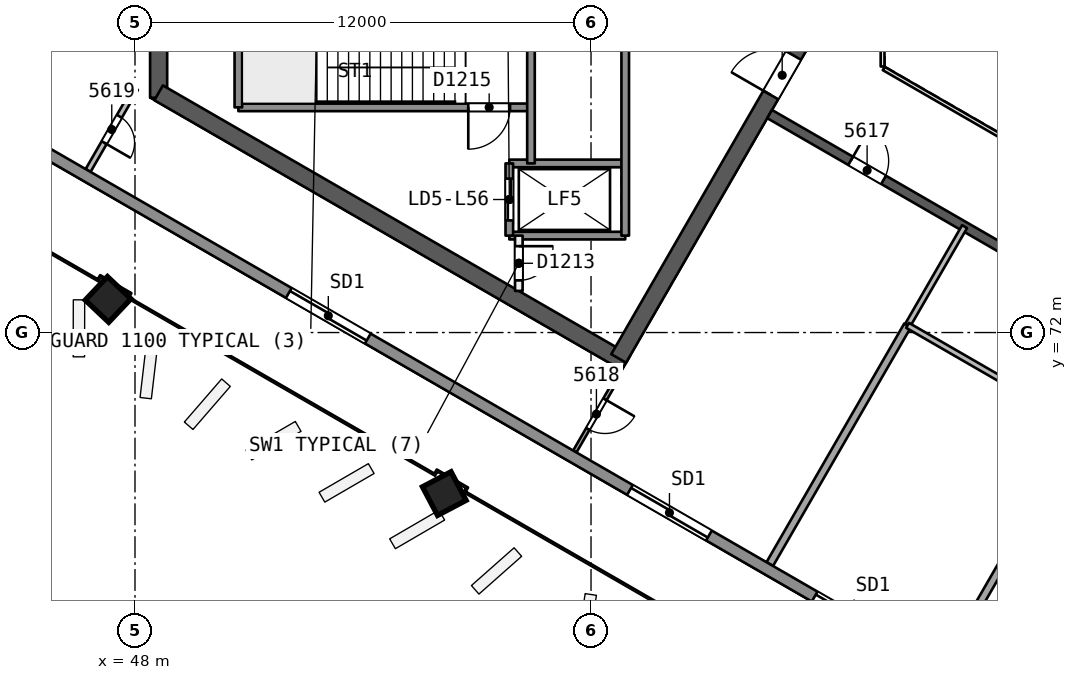
"""IFC4 building model, lengths in metres.
Left out: names, types, materials, properties, quantities, classifications, styles, units other than length and angle.
Written with IfcOpenShell. Run it as: python <this file> out.ifc"""

import sys

from ifc_helpers import new_model, si_unit, direction, frame, frame_2d, origin, origin_2d, place, context, subcontext, project, spatial, rectangle, extrude, element, fill, save


model = new_model("IFC4")
c1 = context("Model", 3, precision=1e-05, world=origin(), true_north=direction((0.0, 1.0)))
c2 = subcontext(c1, "Body", "Model", "MODEL_VIEW")
j1 = project(units=[si_unit("LENGTHUNIT", "METRE"), si_unit("PLANEANGLEUNIT", "RADIAN")], contexts=[c1])
p1 = place(None, origin())
s1 = spatial("IfcSite", under=j1, at=p1, CompositionType="ELEMENT")
p2 = place(p1, origin())
s2 = spatial("IfcBuilding", under=s1, at=p2, CompositionType="ELEMENT")
p3 = place(p2, frame((0.0, 0.0, 228.0)))
s3 = spatial("IfcBuildingStorey", under=s2, at=p3, CompositionType="ELEMENT", Elevation=228.0)
p4 = place(p3, frame((48.622, 81.693, 0.0), z_axis=(0.0, 0.0, 1.0), x_axis=(0.0, -1.0, 0.0)))
e1 = element("IfcWall", 1, at=p4, inside=s3, PredefinedType="SHEAR", context=c2, shape_type="SweptSolid", body=[
    extrude(rectangle(XDim=3.515, YDim=0.45, at=frame_2d((1.758, 0.0))), origin(), (0.0, 0.0, 1.0), 3.7),
])
p5 = place(p3, frame((48.622, 78.307, 0.0), z_axis=(0.0, 0.0, 1.0), x_axis=(0.86602701116, -0.499997215934, 0.0)))
e2 = element("IfcWall", 2, at=p5, inside=s3, PredefinedType="SHEAR", context=c2, shape_type="SweptSolid", body=[
    extrude(rectangle(XDim=14.204, YDim=0.45, at=frame_2d((7.102, 0.0))), origin(), (0.0, 0.0, 1.0), 3.7),
])
p6 = place(p3, frame((60.728, 71.318, 0.0), z_axis=(0.0, 0.0, 1.0), x_axis=(0.500012416173, 0.866018235185, 0.0)))
e3 = element("IfcWall", 3, at=p6, inside=s3, PredefinedType="SHEAR", context=c2, shape_type="SweptSolid", body=[
    extrude(rectangle(XDim=10.155, YDim=0.45, at=frame_2d((5.078, 0.0))), origin(), (0.0, 0.0, 1.0), 3.7),
])
p7 = place(p6, frame((8.005, 0.0, 0.0)))
e4 = element("IfcOpeningElement", 4, at=p7, cuts=e3, PredefinedType="OPENING", context=c2, shape_type="SweptSolid", body=[
    extrude(rectangle(XDim=1.2, YDim=2.1, at=frame_2d((0.6, 1.05))), frame((0.0, 0.235, 0.0), z_axis=(0.0, -1.0, 0.0), x_axis=(1.0, 0.0, 0.0)), (0.0, 0.0, 1.0), 0.471),
])
p8 = place(p3, frame((64.7, 77.748, 0.0), z_axis=(0.0, 0.0, 1.0), x_axis=(0.866026492143, -0.499998114903, 0.0)))
e5 = element("IfcWall", 5, at=p8, inside=s3, PredefinedType="SHEAR", context=c2, shape_type="SweptSolid", body=[
    extrude(rectangle(XDim=15.588, YDim=0.25, at=frame_2d((7.794, 0.0))), origin(), (0.0, 0.0, 1.0), 3.3),
])
p9 = place(p8, frame((2.462, 0.0, 0.0)))
e6 = element("IfcOpeningElement", 6, at=p9, cuts=e5, PredefinedType="OPENING", context=c2, shape_type="SweptSolid", body=[
    extrude(rectangle(XDim=1.0, YDim=2.1, at=frame_2d((0.5, 1.05))), frame((0.0, 0.135, 0.0), z_axis=(0.0, -1.0, 0.0), x_axis=(1.0, 0.0, 0.0)), (0.0, 0.0, 1.0), 0.271),
])
p10 = place(p8, frame((9.474, 0.0, 0.0)))
e7 = element("IfcOpeningElement", 7, at=p10, cuts=e5, PredefinedType="OPENING", context=c2, shape_type="SweptSolid", body=[
    extrude(rectangle(XDim=1.1, YDim=2.1, at=frame_2d((0.55, 1.05))), frame((0.0, 0.135, 0.0), z_axis=(0.0, -1.0, 0.0), x_axis=(1.0, 0.0, 0.0)), (0.0, 0.0, 1.0), 0.271),
])
p11 = place(p8, frame((12.906, 0.0, 0.0)))
e8 = element("IfcOpeningElement", 8, at=p11, cuts=e5, PredefinedType="OPENING", context=c2, shape_type="SweptSolid", body=[
    extrude(rectangle(XDim=1.0, YDim=2.1, at=frame_2d((0.5, 1.05))), frame((0.0, 0.135, 0.0), z_axis=(0.0, -1.0, 0.0), x_axis=(1.0, 0.0, 0.0)), (0.0, 0.0, 1.0), 0.271),
])
p12 = place(p3, frame((47.258, 72.862, 0.0), z_axis=(0.028559101991, 0.006859460986, 0.999568569678), x_axis=(-0.866410384874, 0.498876768373, 0.021331079692)))
e9 = element("IfcColumn", 9, at=p12, inside=s3, PredefinedType="COLUMN", context=c2, shape_type="SweptSolid", body=[
    extrude(rectangle(XDim=0.85, YDim=0.85, at=origin_2d()), origin(), (0.0, 0.0, 1.0), 3.702),
])
p13 = place(p3, frame((56.116, 67.748, 0.0), z_axis=(0.019328516974, 0.012138044789, 0.999739504221), x_axis=(-0.865690909737, 0.500465383244, 0.010660627254)))
e10 = element("IfcColumn", 10, at=p13, inside=s3, PredefinedType="COLUMN", context=c2, shape_type="SweptSolid", body=[
    extrude(rectangle(XDim=0.85, YDim=0.85, at=origin_2d()), origin(), (0.0, 0.0, 1.0), 3.701),
])
p14 = place(p3, frame((60.71, 70.838, 0.0), z_axis=(0.0, 0.0, 1.0), x_axis=(-0.499948534732, -0.866055115232, 0.0)))
e11 = element("IfcWall", 11, at=p14, inside=s3, PredefinedType="PARTITIONING", context=c2, shape_type="SweptSolid", body=[
    extrude(rectangle(XDim=2.275, YDim=0.1, at=frame_2d((1.137, 0.0))), origin(), (0.0, 0.0, 1.0), 3.3),
])
p15 = place(p14, frame((0.687, 0.0, 0.0)))
e12 = element("IfcOpeningElement", 12, at=p15, cuts=e11, PredefinedType="OPENING", context=c2, shape_type="SweptSolid", body=[
    extrude(rectangle(XDim=0.9, YDim=2.1, at=frame_2d((0.45, 1.05))), frame((0.0, 0.061, 0.0), z_axis=(0.0, -1.0, 0.0), x_axis=(1.0, 0.0, 0.0)), (0.0, 0.0, 1.0), 0.121),
])
p16 = place(p3, frame((64.703, 65.907, 0.0), z_axis=(0.0, 0.0, 1.0), x_axis=(0.500019628412, 0.866014071019, 0.0)))
e13 = element("IfcWall", 13, at=p16, inside=s3, PredefinedType="PARTITIONING", context=c2, shape_type="SweptSolid", body=[
    extrude(rectangle(XDim=7.254, YDim=0.2, at=frame_2d((3.627, 0.0))), origin(), (0.0, 0.0, 1.0), 3.3),
])
p17 = place(p3, frame((68.33, 72.188, 0.0), z_axis=(0.0, 0.0, 1.0), x_axis=(0.499990139034, 0.866031096941, 0.0)))
e14 = element("IfcWall", 14, at=p17, inside=s3, PredefinedType="PARTITIONING", context=c2, shape_type="SweptSolid", body=[
    extrude(rectangle(XDim=3.0, YDim=0.15, at=frame_2d((1.5, 0.0))), origin(), (0.0, 0.0, 1.0), 3.3),
])
p18 = place(p3, frame((48.012, 78.422, 0.0), z_axis=(0.0, 0.0, 1.0), x_axis=(-0.500047477074, -0.865997991148, 0.0)))
e15 = element("IfcWall", 15, at=p18, inside=s3, PredefinedType="PARTITIONING", context=c2, shape_type="SweptSolid", body=[
    extrude(rectangle(XDim=2.492, YDim=0.15, at=frame_2d((1.246, 0.0))), origin(), (0.0, 0.0, 1.0), 3.3),
])
p19 = place(p18, frame((0.846, 0.0, 0.0)))
e16 = element("IfcOpeningElement", 16, at=p19, cuts=e15, PredefinedType="OPENING", context=c2, shape_type="SweptSolid", body=[
    extrude(rectangle(XDim=0.8, YDim=2.1, at=frame_2d((0.4, 1.05))), frame((0.0, 0.085, 0.0), z_axis=(0.0, -1.0, 0.0), x_axis=(1.0, 0.0, 0.0)), (0.0, 0.0, 1.0), 0.171),
])
p20 = place(p3, frame((70.842, 70.739, 0.0), z_axis=(0.0, 0.0, 1.0), x_axis=(-0.866032775405, 0.499987231761, 0.0)))
e17 = element("IfcWall", 17, at=p20, inside=s3, PredefinedType="PARTITIONING", context=c2, shape_type="SweptSolid", body=[
    extrude(rectangle(XDim=2.9, YDim=0.15, at=frame_2d((1.45, 0.0))), origin(), (0.0, 0.0, 1.0), 3.3),
])
p21 = place(p3, frame((69.293, 63.257, 0.0), z_axis=(0.0, 0.0, 1.0), x_axis=(0.49999314277, 0.866029362772, 0.0)))
e18 = element("IfcWall", 18, at=p21, inside=s3, PredefinedType="PARTITIONING", context=c2, shape_type="SweptSolid", body=[
    extrude(rectangle(XDim=10.254, YDim=0.2, at=frame_2d((5.127, 0.0))), origin(), (0.0, 0.0, 1.0), 3.3),
])
p22 = place(p3, frame((88.043, 52.259, 0.0), z_axis=(0.0, 0.0, 1.0), x_axis=(-0.86602387423, 0.500002649256, 0.0)))
e19 = element("IfcWall", 19, at=p22, inside=s3, PredefinedType="SOLIDWALL", context=c2, shape_type="SweptSolid", body=[
    extrude(rectangle(XDim=50.333, YDim=0.3, at=frame_2d((25.167, 0.0))), origin(), (0.0, 0.0, 1.0), 3.3),
])
p23 = place(p22, frame((23.187, 0.0, 0.0)))
e20 = element("IfcOpeningElement", 20, at=p23, cuts=e19, PredefinedType="OPENING", context=c2, shape_type="SweptSolid", body=[
    extrude(rectangle(XDim=2.4, YDim=2.4, at=frame_2d((1.2, 1.2))), frame((0.0, 0.161, 0.0), z_axis=(0.0, -1.0, 0.0), x_axis=(1.0, 0.0, 0.0)), (0.0, 0.0, 1.0), 0.321),
])
p24 = place(p22, frame((28.799, 0.0, 0.0)))
e21 = element("IfcOpeningElement", 21, at=p24, cuts=e19, PredefinedType="OPENING", context=c2, shape_type="SweptSolid", body=[
    extrude(rectangle(XDim=2.4, YDim=2.4, at=frame_2d((1.2, 1.2))), frame((0.0, 0.161, 0.0), z_axis=(0.0, -1.0, 0.0), x_axis=(1.0, 0.0, 0.0)), (0.0, 0.0, 1.0), 0.321),
])
p25 = place(p22, frame((39.164, 0.0, 0.0)))
e22 = element("IfcOpeningElement", 22, at=p25, cuts=e19, PredefinedType="OPENING", context=c2, shape_type="SweptSolid", body=[
    extrude(rectangle(XDim=2.4, YDim=2.4, at=frame_2d((1.2, 1.2))), frame((0.0, 0.161, 0.0), z_axis=(0.0, -1.0, 0.0), x_axis=(1.0, 0.0, 0.0)), (0.0, 0.0, 1.0), 0.321),
])
p26 = place(p22, frame((18.354, 0.0, 0.0)))
e23 = element("IfcOpeningElement", 23, at=p26, cuts=e19, PredefinedType="OPENING", context=c2, shape_type="SweptSolid", body=[
    extrude(rectangle(XDim=2.4, YDim=2.4, at=frame_2d((1.2, 1.2))), frame((0.0, 0.161, 0.0), z_axis=(0.0, -1.0, 0.0), x_axis=(1.0, 0.0, 0.0)), (0.0, 0.0, 1.0), 0.321),
])
p27 = place(p22, frame((8.763, 0.0, 0.0)))
e24 = element("IfcOpeningElement", 24, at=p27, cuts=e19, PredefinedType="OPENING", context=c2, shape_type="SweptSolid", body=[
    extrude(rectangle(XDim=2.4, YDim=2.4, at=frame_2d((1.2, 1.2))), frame((0.0, 0.161, 0.0), z_axis=(0.0, -1.0, 0.0), x_axis=(1.0, 0.0, 0.0)), (0.0, 0.0, 1.0), 0.321),
])
p28 = place(p3, frame((58.42, 77.925, 0.0), z_axis=(0.0, 0.0, 1.0), x_axis=(-1.0, 0.0, 0.0)))
e25 = element("IfcWall", 25, at=p28, inside=s3, PredefinedType="SOLIDWALL", context=c2, shape_type="SweptSolid", body=[
    extrude(rectangle(XDim=7.7, YDim=0.2, at=frame_2d((3.85, 0.0))), origin(), (0.0, 0.0, 1.0), 3.3),
])
p29 = place(p28, frame((0.55, 0.0, 0.0)))
e26 = element("IfcOpeningElement", 26, at=p29, cuts=e25, PredefinedType="OPENING", context=c2, shape_type="SweptSolid", body=[
    extrude(rectangle(XDim=1.1, YDim=2.1, at=frame_2d((0.55, 1.05))), frame((0.0, 0.11, 0.0), z_axis=(0.0, -1.0, 0.0), x_axis=(1.0, 0.0, 0.0)), (0.0, 0.0, 1.0), 0.221),
])
for number, where, z_axis, x_axis in (
    (27, (60.9, 76.45, 0.0), (0.0, 0.0, 1.0), (-1.0, 0.0, 0.0)),
    (28, (60.9, 74.55, 0.0), (0.0, 0.0, 1.0), (-1.0, 0.0, 0.0)),
):
    element("IfcWall", number, at=place(p3, frame(where, z_axis=z_axis, x_axis=x_axis)), inside=s3, PredefinedType="SOLIDWALL", context=c2, shape_type="SweptSolid", body=[
        extrude(rectangle(XDim=3.05, YDim=0.2, at=frame_2d((1.525, 0.0))), origin(), (0.0, 0.0, 1.0), 3.3),
    ])
p30 = place(p3, frame((60.9, 85.45, 0.0), z_axis=(0.0, 0.0, 1.0), x_axis=(0.0, -1.0, 0.0)))
e29 = element("IfcWall", 29, at=p30, inside=s3, PredefinedType="SOLIDWALL", context=c2, shape_type="SweptSolid", body=[
    extrude(rectangle(XDim=10.9, YDim=0.2, at=frame_2d((5.45, 0.0))), origin(), (0.0, 0.0, 1.0), 3.3),
])
p31 = place(p30, frame((4.0, 0.0, 0.0)))
e30 = element("IfcOpeningElement", 30, at=p31, cuts=e29, PredefinedType="OPENING", context=c2, shape_type="SweptSolid", body=[
    extrude(rectangle(XDim=1.0, YDim=2.1, at=frame_2d((0.5, 1.05))), frame((0.0, 0.11, 0.0), z_axis=(0.0, -1.0, 0.0), x_axis=(1.0, 0.0, 0.0)), (0.0, 0.0, 1.0), 0.221),
])
p32 = place(p3, frame((58.42, 87.09, 0.0), z_axis=(0.0, 0.0, 1.0), x_axis=(0.0, -1.0, 0.0)))
e31 = element("IfcWall", 31, at=p32, inside=s3, PredefinedType="SOLIDWALL", context=c2, shape_type="SweptSolid", body=[
    extrude(rectangle(XDim=10.64, YDim=0.2, at=frame_2d((5.32, 0.0))), origin(), (0.0, 0.0, 1.0), 3.3),
])
p33 = place(p32, frame((0.37, 0.0, 0.0)))
e32 = element("IfcOpeningElement", 32, at=p33, cuts=e31, PredefinedType="OPENING", context=c2, shape_type="SweptSolid", body=[
    extrude(rectangle(XDim=0.9, YDim=2.1, at=frame_2d((0.45, 1.05))), frame((0.0, 0.11, 0.0), z_axis=(0.0, -1.0, 0.0), x_axis=(1.0, 0.0, 0.0)), (0.0, 0.0, 1.0), 0.221),
])
p34 = place(p3, frame((58.1, 74.55, 0.0), z_axis=(0.0, 0.0, 1.0), x_axis=(0.0, -1.0, 0.0)))
e33 = element("IfcWall", 33, at=p34, inside=s3, PredefinedType="PARTITIONING", context=c2, shape_type="SweptSolid", body=[
    extrude(rectangle(XDim=1.455, YDim=0.2, at=frame_2d((0.728, 0.0))), origin(), (0.0, 0.0, 1.0), 3.3),
])
p35 = place(p34, frame((0.278, 0.0, 0.0)))
e34 = element("IfcOpeningElement", 34, at=p35, cuts=e33, PredefinedType="OPENING", context=c2, shape_type="SweptSolid", body=[
    extrude(rectangle(XDim=0.9, YDim=2.1, at=frame_2d((0.45, 1.05))), frame((0.0, 0.11, 0.0), z_axis=(0.0, -1.0, 0.0), x_axis=(1.0, 0.0, 0.0)), (0.0, 0.0, 1.0), 0.221),
])
p36 = place(p3, frame((57.85, 76.45, 0.0), z_axis=(0.0, 0.0, 1.0), x_axis=(0.0, -1.0, 0.0)))
e35 = element("IfcWall", 35, at=p36, inside=s3, PredefinedType="SOLIDWALL", context=c2, shape_type="SweptSolid", body=[
    extrude(rectangle(XDim=1.9, YDim=0.2, at=frame_2d((0.95, 0.0))), origin(), (0.0, 0.0, 1.0), 3.3),
])
p37 = place(p36, frame((0.4, 0.0, 0.0)))
e36 = element("IfcOpeningElement", 36, at=p37, cuts=e35, PredefinedType="OPENING", context=c2, shape_type="SweptSolid", body=[
    extrude(rectangle(XDim=1.1, YDim=2.1, at=frame_2d((0.55, 1.05))), frame((0.0, 0.11, 0.0), z_axis=(0.0, -1.0, 0.0), x_axis=(1.0, 0.0, 0.0)), (0.0, 0.0, 1.0), 0.221),
])
p38 = place(p3, frame((50.72, 82.075, 0.0), z_axis=(0.0, 0.0, 1.0), x_axis=(0.0, -1.0, 0.0)))
e37 = element("IfcWall", 37, at=p38, inside=s3, PredefinedType="SOLIDWALL", context=c2, shape_type="SweptSolid", body=[
    extrude(rectangle(XDim=4.15, YDim=0.2, at=frame_2d((2.075, 0.0))), origin(), (0.0, 0.0, 1.0), 3.3),
])
p39 = place(p3, frame((67.672, 81.0, 0.0), z_axis=(0.0, 0.0, 1.0), x_axis=(0.0, -1.0, 0.0)))
e38 = element("IfcWall", 38, at=p39, inside=s3, PredefinedType="PARTITIONING", context=c2, shape_type="SweptSolid", body=[
    extrude(rectangle(XDim=2.0, YDim=0.1, at=frame_2d((1.0, 0.0))), origin(), (0.0, 0.0, 1.0), 3.3),
])
p40 = place(p3, frame((67.702, 78.948, 0.0), z_axis=(0.0, 0.0, 1.0), x_axis=(0.866026658274, -0.499997827154, 0.0)))
e39 = element("IfcWall", 39, at=p40, inside=s3, PredefinedType="PARTITIONING", context=c2, shape_type="SweptSolid", body=[
    extrude(rectangle(XDim=11.588, YDim=0.1, at=frame_2d((5.794, 0.0))), origin(), (0.0, 0.0, 1.0), 3.3),
])
p41 = place(p9, origin())
e40 = element("IfcDoor", 40, at=p41, inside=s3, OperationType="SINGLE_SWING_LEFT", PredefinedType="NOTDEFINED", context=c2, shape_type="SweptSolid", body=[
    extrude(rectangle(XDim=1.0, YDim=2.1, at=frame_2d((0.5, 1.05))), frame((0.0, 0.025, 0.0), z_axis=(0.0, -1.0, 0.0), x_axis=(1.0, 0.0, 0.0)), (0.0, 0.0, 1.0), 0.05),
])
fill(e6, e40)
p42 = place(p15, origin())
e41 = element("IfcDoor", 41, at=p42, inside=s3, OperationType="SINGLE_SWING_LEFT", PredefinedType="NOTDEFINED", context=c2, shape_type="SweptSolid", body=[
    extrude(rectangle(XDim=0.9, YDim=2.1, at=frame_2d((0.45, 1.05))), frame((0.0, 0.025, 0.0), z_axis=(0.0, -1.0, 0.0), x_axis=(1.0, 0.0, 0.0)), (0.0, 0.0, 1.0), 0.05),
])
fill(e12, e41)
p43 = place(p19, origin())
e42 = element("IfcDoor", 42, at=p43, inside=s3, OperationType="SINGLE_SWING_RIGHT", PredefinedType="NOTDEFINED", context=c2, shape_type="SweptSolid", body=[
    extrude(rectangle(XDim=0.8, YDim=2.1, at=frame_2d((0.4, 1.05))), frame((0.0, 0.025, 0.0), z_axis=(0.0, -1.0, 0.0), x_axis=(1.0, 0.0, 0.0)), (0.0, 0.0, 1.0), 0.05),
])
fill(e16, e42)
p44 = place(p23, origin())
e43 = element("IfcDoor", 43, at=p44, inside=s3, OperationType="SLIDING_TO_LEFT", PredefinedType="NOTDEFINED", context=c2, shape_type="SweptSolid", body=[
    extrude(rectangle(XDim=2.4, YDim=2.4, at=frame_2d((1.2, 1.2))), frame((0.0, 0.025, 0.0), z_axis=(0.0, -1.0, 0.0), x_axis=(1.0, 0.0, 0.0)), (0.0, 0.0, 1.0), 0.05),
])
fill(e20, e43)
p45 = place(p24, origin())
e44 = element("IfcDoor", 44, at=p45, inside=s3, OperationType="SLIDING_TO_RIGHT", PredefinedType="NOTDEFINED", context=c2, shape_type="SweptSolid", body=[
    extrude(rectangle(XDim=2.4, YDim=2.4, at=frame_2d((1.2, 1.2))), frame((0.0, 0.025, 0.0), z_axis=(0.0, -1.0, 0.0), x_axis=(1.0, 0.0, 0.0)), (0.0, 0.0, 1.0), 0.05),
])
fill(e21, e44)
p46 = place(p25, origin())
e45 = element("IfcDoor", 45, at=p46, inside=s3, OperationType="SLIDING_TO_LEFT", PredefinedType="NOTDEFINED", context=c2, shape_type="SweptSolid", body=[
    extrude(rectangle(XDim=2.4, YDim=2.4, at=frame_2d((1.2, 1.2))), frame((0.0, 0.025, 0.0), z_axis=(0.0, -1.0, 0.0), x_axis=(1.0, 0.0, 0.0)), (0.0, 0.0, 1.0), 0.05),
])
fill(e22, e45)
p47 = place(p7, origin())
e46 = element("IfcDoor", 46, at=p47, inside=s3, OperationType="SINGLE_SWING_LEFT", PredefinedType="NOTDEFINED", context=c2, shape_type="SweptSolid", body=[
    extrude(rectangle(XDim=1.2, YDim=2.1, at=frame_2d((0.6, 1.05))), frame((0.0, 0.025, 0.0), z_axis=(0.0, -1.0, 0.0), x_axis=(1.0, 0.0, 0.0)), (0.0, 0.0, 1.0), 0.05),
])
fill(e4, e46)
p48 = place(p37, origin())
e47 = element("IfcDoor", 47, at=p48, inside=s3, OperationType="SLIDING_TO_RIGHT", PredefinedType="NOTDEFINED", context=c2, shape_type="SweptSolid", body=[
    extrude(rectangle(XDim=1.1, YDim=2.1, at=frame_2d((0.55, 1.05))), frame((0.0, 0.025, 0.0), z_axis=(0.0, -1.0, 0.0), x_axis=(1.0, 0.0, 0.0)), (0.0, 0.0, 1.0), 0.05),
])
fill(e36, e47)
p49 = place(p35, origin())
e48 = element("IfcDoor", 48, at=p49, inside=s3, OperationType="SINGLE_SWING_LEFT", PredefinedType="NOTDEFINED", context=c2, shape_type="SweptSolid", body=[
    extrude(rectangle(XDim=0.9, YDim=2.1, at=frame_2d((0.45, 1.05))), frame((0.0, 0.025, 0.0), z_axis=(0.0, -1.0, 0.0), x_axis=(1.0, 0.0, 0.0)), (0.0, 0.0, 1.0), 0.05),
])
fill(e34, e48)
p50 = place(p29, origin())
e49 = element("IfcDoor", 49, at=p50, inside=s3, OperationType="SINGLE_SWING_RIGHT", PredefinedType="NOTDEFINED", context=c2, shape_type="SweptSolid", body=[
    extrude(rectangle(XDim=1.1, YDim=2.1, at=frame_2d((0.55, 1.05))), frame((0.0, 0.025, 0.0), z_axis=(0.0, -1.0, 0.0), x_axis=(1.0, 0.0, 0.0)), (0.0, 0.0, 1.0), 0.05),
])
fill(e26, e49)
save(model, sys.argv[1])
